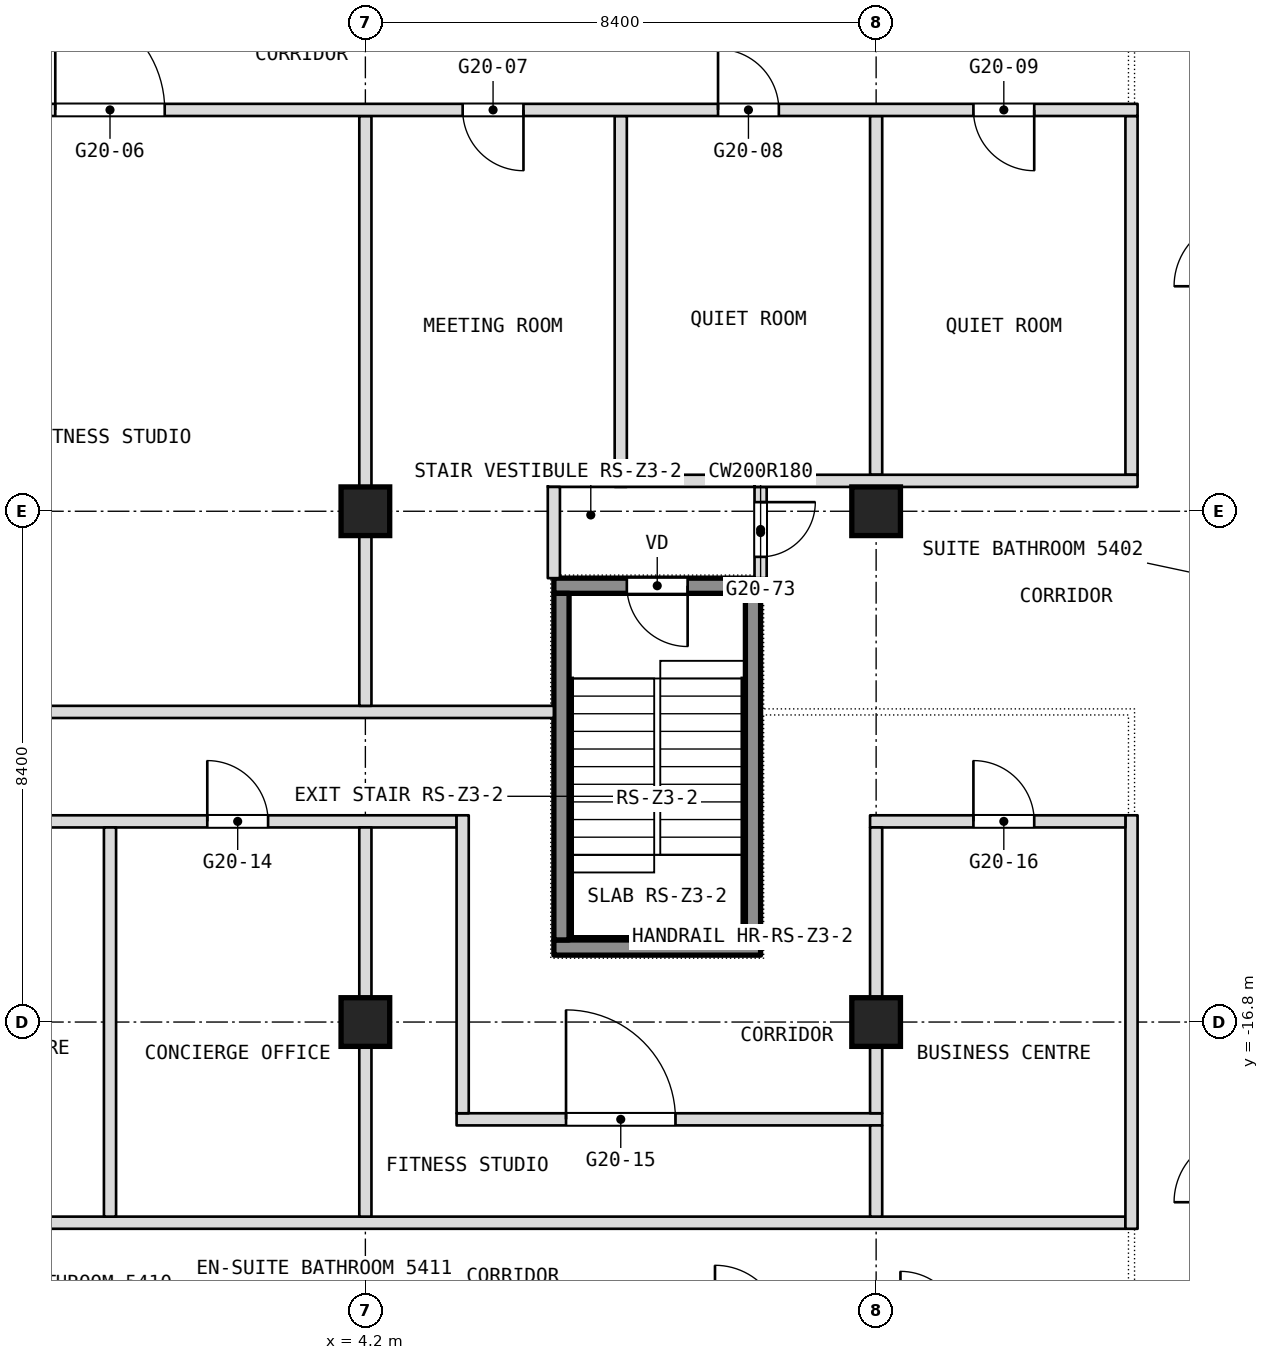
"""IFC4 building model, lengths in metres.
Left out: names, types, materials, properties, quantities, classifications, styles, units other than length and angle.
Written with IfcOpenShell. Run it as: python <this file> out.ifc"""

import sys

from ifc_helpers import new_model, si_unit, direction, frame, frame_2d, origin, origin_2d, place, context, subcontext, project, spatial, rectangle, extrude, element, fill, save


model = new_model("IFC4")
c1 = context("Model", 3, precision=1e-05, world=origin(), true_north=direction((0.0, 1.0)))
c2 = subcontext(c1, "Body", "Model", "MODEL_VIEW")
j1 = project(units=[si_unit("LENGTHUNIT", "METRE"), si_unit("PLANEANGLEUNIT", "RADIAN")], contexts=[c1])
p1 = place(None, origin())
s1 = spatial("IfcSite", under=j1, at=p1, CompositionType="ELEMENT")
p2 = place(p1, origin())
s2 = spatial("IfcBuilding", under=s1, at=p2, CompositionType="ELEMENT")
p3 = place(p2, frame((0.0, 0.0, 230.9)))
s3 = spatial("IfcBuildingStorey", under=s2, at=p3, CompositionType="ELEMENT", Elevation=230.9)
for number, where, z_axis, x_axis in (
    (1, (4.2, -16.8, 0.0), (0.0, 0.0, 1.0), (1.0, 0.0, 0.0)),
    (2, (4.2, -8.4, 0.0), (0.0, 0.0, 1.0), (1.0, 0.0, 0.0)),
    (3, (12.6, -16.8, 0.0), (0.0, 0.0, 1.0), (1.0, 0.0, 0.0)),
    (4, (12.6, -8.4, 0.0), (0.0, 0.0, 1.0), (1.0, 0.0, 0.0)),
):
    element("IfcColumn", number, at=place(p3, frame(where, z_axis=z_axis, x_axis=x_axis)), inside=s3, PredefinedType="COLUMN", context=c2, shape_type="SweptSolid", body=[
        extrude(rectangle(XDim=0.8, YDim=0.8, at=origin_2d()), origin(), (0.0, 0.0, 1.0), 3.6),
    ])
p4 = place(p3, frame((-16.7, -20.1, 0.0), z_axis=(0.0, 0.0, 1.0), x_axis=(1.0, 0.0, 0.0)))
e5 = element("IfcWall", 5, at=p4, inside=s3, PredefinedType="PARTITIONING", context=c2, shape_type="SweptSolid", body=[
    extrude(rectangle(XDim=33.4, YDim=0.2, at=frame_2d((16.7, 0.0))), origin(), (0.0, 0.0, 1.0), 3.34),
])
p5 = place(p3, frame((5.7, -18.4, 0.0), z_axis=(0.0, 0.0, 1.0), x_axis=(1.0, 0.0, 0.0)))
e6 = element("IfcWall", 6, at=p5, inside=s3, PredefinedType="PARTITIONING", context=c2, shape_type="SweptSolid", body=[
    extrude(rectangle(XDim=7.0, YDim=0.2, at=frame_2d((3.5, 0.0))), origin(), (0.0, 0.0, 1.0), 3.34),
])
p6 = place(p5, frame((1.8, 0.0, 0.0)))
e7 = element("IfcOpeningElement", 7, at=p6, cuts=e6, PredefinedType="OPENING", context=c2, shape_type="SweptSolid", body=[
    extrude(rectangle(XDim=1.8, YDim=2.1, at=frame_2d((0.9, 1.05))), frame((0.0, 0.1, 0.0), z_axis=(0.0, -1.0, 0.0), x_axis=(1.0, 0.0, 0.0)), (0.0, 0.0, 1.0), 0.2),
])
p7 = place(p3, frame((16.8, -20.2, 0.0), z_axis=(0.0, 0.0, 1.0), x_axis=(0.0, 1.0, 0.0)))
e8 = element("IfcWall", 8, at=p7, inside=s3, PredefinedType="PARTITIONING", context=c2, shape_type="SweptSolid", body=[
    extrude(rectangle(XDim=6.8, YDim=0.2, at=frame_2d((3.4, 0.0))), origin(), (0.0, 0.0, 1.0), 3.34),
])
p8 = place(p3, frame((16.8, -7.8, 0.0), z_axis=(0.0, 0.0, 1.0), x_axis=(0.0, 1.0, 0.0)))
e9 = element("IfcWall", 9, at=p8, inside=s3, PredefinedType="PARTITIONING", context=c2, shape_type="SweptSolid", body=[
    extrude(rectangle(XDim=5.9, YDim=0.2, at=frame_2d((2.95, 0.0))), origin(), (0.0, 0.0, 1.0), 3.34),
])
p9 = place(p3, frame((-5.9, -13.5, 0.0), z_axis=(0.0, 0.0, 1.0), x_axis=(1.0, 0.0, 0.0)))
e10 = element("IfcWall", 10, at=p9, inside=s3, PredefinedType="PARTITIONING", context=c2, shape_type="SweptSolid", body=[
    extrude(rectangle(XDim=11.6, YDim=0.2, at=frame_2d((5.8, 0.0))), origin(), (0.0, 0.0, 1.0), 3.34),
])
p10 = place(p9, frame((3.3, 0.0, 0.0)))
e11 = element("IfcOpeningElement", 11, at=p10, cuts=e10, PredefinedType="OPENING", context=c2, shape_type="SweptSolid", body=[
    extrude(rectangle(XDim=1.0, YDim=2.1, at=frame_2d((0.5, 1.05))), frame((0.0, 0.1, 0.0), z_axis=(0.0, -1.0, 0.0), x_axis=(1.0, 0.0, 0.0)), (0.0, 0.0, 1.0), 0.2),
])
p11 = place(p9, frame((7.5, 0.0, 0.0)))
e12 = element("IfcOpeningElement", 12, at=p11, cuts=e10, PredefinedType="OPENING", context=c2, shape_type="SweptSolid", body=[
    extrude(rectangle(XDim=1.0, YDim=2.1, at=frame_2d((0.5, 1.05))), frame((0.0, 0.1, 0.0), z_axis=(0.0, -1.0, 0.0), x_axis=(1.0, 0.0, 0.0)), (0.0, 0.0, 1.0), 0.2),
])
p12 = place(p3, frame((12.5, -13.5, 0.0), z_axis=(0.0, 0.0, 1.0), x_axis=(1.0, 0.0, 0.0)))
e13 = element("IfcWall", 13, at=p12, inside=s3, PredefinedType="PARTITIONING", context=c2, shape_type="SweptSolid", body=[
    extrude(rectangle(XDim=4.2, YDim=0.2, at=frame_2d((2.1, 0.0))), origin(), (0.0, 0.0, 1.0), 3.34),
])
p13 = place(p12, frame((1.7, 0.0, 0.0)))
e14 = element("IfcOpeningElement", 14, at=p13, cuts=e13, PredefinedType="OPENING", context=c2, shape_type="SweptSolid", body=[
    extrude(rectangle(XDim=1.0, YDim=2.1, at=frame_2d((0.5, 1.05))), frame((0.0, 0.1, 0.0), z_axis=(0.0, -1.0, 0.0), x_axis=(1.0, 0.0, 0.0)), (0.0, 0.0, 1.0), 0.2),
])
p14 = place(p3, frame((12.6, -20.0, 0.0), z_axis=(0.0, 0.0, 1.0), x_axis=(0.0, 1.0, 0.0)))
e15 = element("IfcWall", 15, at=p14, inside=s3, PredefinedType="PARTITIONING", context=c2, shape_type="SweptSolid", body=[
    extrude(rectangle(XDim=1.5, YDim=0.2, at=frame_2d((0.75, 0.0))), origin(), (0.0, 0.0, 1.0), 3.34),
])
p15 = place(p3, frame((12.6, -7.8, 0.0), z_axis=(0.0, 0.0, 1.0), x_axis=(0.0, 1.0, 0.0)))
e16 = element("IfcWall", 16, at=p15, inside=s3, PredefinedType="PARTITIONING", context=c2, shape_type="SweptSolid", body=[
    extrude(rectangle(XDim=5.9, YDim=0.2, at=frame_2d((2.95, 0.0))), origin(), (0.0, 0.0, 1.0), 3.34),
])
p16 = place(p3, frame((12.6, -18.3, 0.0), z_axis=(0.0, 0.0, 1.0), x_axis=(0.0, 1.0, 0.0)))
e17 = element("IfcWall", 17, at=p16, inside=s3, PredefinedType="PARTITIONING", context=c2, shape_type="SweptSolid", body=[
    extrude(rectangle(XDim=4.7, YDim=0.2, at=frame_2d((2.35, 0.0))), origin(), (0.0, 0.0, 1.0), 3.34),
])
p17 = place(p3, frame((-7.3, -11.7, 0.0), z_axis=(0.0, 0.0, 1.0), x_axis=(1.0, 0.0, 0.0)))
e18 = element("IfcWall", 18, at=p17, inside=s3, PredefinedType="PARTITIONING", context=c2, shape_type="SweptSolid", body=[
    extrude(rectangle(XDim=14.6, YDim=0.2, at=frame_2d((7.3, 0.0))), origin(), (0.0, 0.0, 1.0), 3.34),
])
p18 = place(p3, frame((10.7, -9.5, 0.0), z_axis=(0.0, 0.0, 1.0), x_axis=(0.0, 1.0, 0.0)))
e19 = element("IfcWall", 19, at=p18, inside=s3, PredefinedType="PARTITIONING", context=c2, shape_type="SweptSolid", body=[
    extrude(rectangle(XDim=1.5, YDim=0.2, at=frame_2d((0.75, 0.0))), origin(), (0.0, 0.0, 1.0), 3.34),
])
p19 = place(p18, frame((0.35, 0.0, 0.0)))
e20 = element("IfcOpeningElement", 20, at=p19, cuts=e19, PredefinedType="OPENING", context=c2, shape_type="SweptSolid", body=[
    extrude(rectangle(XDim=0.9, YDim=2.1, at=frame_2d((0.45, 1.05))), frame((0.0, 0.1, 0.0), z_axis=(0.0, -1.0, 0.0), x_axis=(1.0, 0.0, 0.0)), (0.0, 0.0, 1.0), 0.2),
])
p20 = place(p3, frame((8.4, -8.0, 0.0), z_axis=(0.0, 0.0, 1.0), x_axis=(0.0, 1.0, 0.0)))
e21 = element("IfcWall", 21, at=p20, inside=s3, PredefinedType="PARTITIONING", context=c2, shape_type="SweptSolid", body=[
    extrude(rectangle(XDim=6.1, YDim=0.2, at=frame_2d((3.05, 0.0))), origin(), (0.0, 0.0, 1.0), 3.34),
])
p21 = place(p3, frame((10.6, -7.9, 0.0), z_axis=(0.0, 0.0, 1.0), x_axis=(1.0, 0.0, 0.0)))
e22 = element("IfcWall", 22, at=p21, inside=s3, PredefinedType="PARTITIONING", context=c2, shape_type="SweptSolid", body=[
    extrude(rectangle(XDim=6.3, YDim=0.2, at=frame_2d((3.15, 0.0))), origin(), (0.0, 0.0, 1.0), 3.34),
])
p22 = place(p3, frame((7.2, -7.9, 0.0), z_axis=(0.0, 0.0, 1.0), x_axis=(1.0, 0.0, 0.0)))
e23 = element("IfcWall", 23, at=p22, inside=s3, PredefinedType="PARTITIONING", context=c2, shape_type="SweptSolid", body=[
    extrude(rectangle(XDim=3.4, YDim=0.2, at=frame_2d((1.7, 0.0))), origin(), (0.0, 0.0, 1.0), 3.34),
])
p23 = place(p3, frame((7.3, -9.5, 0.0), z_axis=(0.0, 0.0, 1.0), x_axis=(0.0, 1.0, 0.0)))
e24 = element("IfcWall", 24, at=p23, inside=s3, PredefinedType="PARTITIONING", context=c2, shape_type="SweptSolid", body=[
    extrude(rectangle(XDim=1.5, YDim=0.2, at=frame_2d((0.75, 0.0))), origin(), (0.0, 0.0, 1.0), 3.34),
])
p24 = place(p3, frame((5.8, -18.3, 0.0), z_axis=(0.0, 0.0, 1.0), x_axis=(0.0, 1.0, 0.0)))
e25 = element("IfcWall", 25, at=p24, inside=s3, PredefinedType="PARTITIONING", context=c2, shape_type="SweptSolid", body=[
    extrude(rectangle(XDim=4.9, YDim=0.2, at=frame_2d((2.45, 0.0))), origin(), (0.0, 0.0, 1.0), 3.34),
])
p25 = place(p3, frame((4.2, -20.0, 0.0), z_axis=(0.0, 0.0, 1.0), x_axis=(0.0, 1.0, 0.0)))
e26 = element("IfcWall", 26, at=p25, inside=s3, PredefinedType="PARTITIONING", context=c2, shape_type="SweptSolid", body=[
    extrude(rectangle(XDim=6.4, YDim=0.2, at=frame_2d((3.2, 0.0))), origin(), (0.0, 0.0, 1.0), 3.34),
])
p26 = place(p3, frame((4.2, -11.6, 0.0), z_axis=(0.0, 0.0, 1.0), x_axis=(0.0, 1.0, 0.0)))
e27 = element("IfcWall", 27, at=p26, inside=s3, PredefinedType="PARTITIONING", context=c2, shape_type="SweptSolid", body=[
    extrude(rectangle(XDim=9.7, YDim=0.2, at=frame_2d((4.85, 0.0))), origin(), (0.0, 0.0, 1.0), 3.34),
])
p27 = place(p3, frame((-16.9, -1.8, 0.0), z_axis=(0.0, 0.0, 1.0), x_axis=(1.0, 0.0, 0.0)))
e28 = element("IfcWall", 28, at=p27, inside=s3, PredefinedType="PARTITIONING", context=c2, shape_type="SweptSolid", body=[
    extrude(rectangle(XDim=33.8, YDim=0.2, at=frame_2d((16.9, 0.0))), origin(), (0.0, 0.0, 1.0), 3.34),
])
p28 = place(p27, frame((1.7, 0.0, 0.0)))
e29 = element("IfcOpeningElement", 29, at=p28, cuts=e28, PredefinedType="OPENING", context=c2, shape_type="SweptSolid", body=[
    extrude(rectangle(XDim=1.0, YDim=2.1, at=frame_2d((0.5, 1.05))), frame((0.0, 0.1, 0.0), z_axis=(0.0, -1.0, 0.0), x_axis=(1.0, 0.0, 0.0)), (0.0, 0.0, 1.0), 0.2),
])
p29 = place(p27, frame((5.9, 0.0, 0.0)))
e30 = element("IfcOpeningElement", 30, at=p29, cuts=e28, PredefinedType="OPENING", context=c2, shape_type="SweptSolid", body=[
    extrude(rectangle(XDim=1.0, YDim=2.1, at=frame_2d((0.5, 1.05))), frame((0.0, 0.1, 0.0), z_axis=(0.0, -1.0, 0.0), x_axis=(1.0, 0.0, 0.0)), (0.0, 0.0, 1.0), 0.2),
])
p30 = place(p27, frame((10.1, 0.0, 0.0)))
e31 = element("IfcOpeningElement", 31, at=p30, cuts=e28, PredefinedType="OPENING", context=c2, shape_type="SweptSolid", body=[
    extrude(rectangle(XDim=1.0, YDim=2.1, at=frame_2d((0.5, 1.05))), frame((0.0, 0.1, 0.0), z_axis=(0.0, -1.0, 0.0), x_axis=(1.0, 0.0, 0.0)), (0.0, 0.0, 1.0), 0.2),
])
p31 = place(p27, frame((16.0, 0.0, 0.0)))
e32 = element("IfcOpeningElement", 32, at=p31, cuts=e28, PredefinedType="OPENING", context=c2, shape_type="SweptSolid", body=[
    extrude(rectangle(XDim=1.8, YDim=2.1, at=frame_2d((0.9, 1.05))), frame((0.0, 0.1, 0.0), z_axis=(0.0, -1.0, 0.0), x_axis=(1.0, 0.0, 0.0)), (0.0, 0.0, 1.0), 0.2),
])
p32 = place(p27, frame((22.7, 0.0, 0.0)))
e33 = element("IfcOpeningElement", 33, at=p32, cuts=e28, PredefinedType="OPENING", context=c2, shape_type="SweptSolid", body=[
    extrude(rectangle(XDim=1.0, YDim=2.1, at=frame_2d((0.5, 1.05))), frame((0.0, 0.1, 0.0), z_axis=(0.0, -1.0, 0.0), x_axis=(1.0, 0.0, 0.0)), (0.0, 0.0, 1.0), 0.2),
])
p33 = place(p27, frame((26.9, 0.0, 0.0)))
e34 = element("IfcOpeningElement", 34, at=p33, cuts=e28, PredefinedType="OPENING", context=c2, shape_type="SweptSolid", body=[
    extrude(rectangle(XDim=1.0, YDim=2.1, at=frame_2d((0.5, 1.05))), frame((0.0, 0.1, 0.0), z_axis=(0.0, -1.0, 0.0), x_axis=(1.0, 0.0, 0.0)), (0.0, 0.0, 1.0), 0.2),
])
p34 = place(p27, frame((31.1, 0.0, 0.0)))
e35 = element("IfcOpeningElement", 35, at=p34, cuts=e28, PredefinedType="OPENING", context=c2, shape_type="SweptSolid", body=[
    extrude(rectangle(XDim=1.0, YDim=2.1, at=frame_2d((0.5, 1.05))), frame((0.0, 0.1, 0.0), z_axis=(0.0, -1.0, 0.0), x_axis=(1.0, 0.0, 0.0)), (0.0, 0.0, 1.0), 0.2),
])
p35 = place(p3, frame((0.0, -20.0, 0.0), z_axis=(0.0, 0.0, 1.0), x_axis=(0.0, 1.0, 0.0)))
e36 = element("IfcWall", 36, at=p35, inside=s3, PredefinedType="PARTITIONING", context=c2, shape_type="SweptSolid", body=[
    extrude(rectangle(XDim=6.4, YDim=0.2, at=frame_2d((3.2, 0.0))), origin(), (0.0, 0.0, 1.0), 3.34),
])
p36 = place(p3, frame((7.3, -15.575, 0.1), z_axis=(0.0, 0.0, 1.0), x_axis=(1.0, 0.0, 0.0)))
e37 = element("IfcWall", 37, at=p36, inside=s3, PredefinedType="SHEAR", context=c2, shape_type="SweptSolid", body=[
    extrude(rectangle(XDim=3.4, YDim=0.25, at=frame_2d((1.7, 0.0))), origin(), (0.0, 0.0, 1.0), 3.6),
])
p37 = place(p3, frame((7.3, -9.625, 0.1), z_axis=(0.0, 0.0, 1.0), x_axis=(1.0, 0.0, 0.0)))
e38 = element("IfcWall", 38, at=p37, inside=s3, PredefinedType="SHEAR", context=c2, shape_type="SweptSolid", body=[
    extrude(rectangle(XDim=3.4, YDim=0.25, at=frame_2d((1.7, 0.0))), origin(), (0.0, 0.0, 1.0), 3.6),
])
p38 = place(p37, frame((1.2, 0.0, 0.0)))
e39 = element("IfcOpeningElement", 39, at=p38, cuts=e38, PredefinedType="OPENING", context=c2, shape_type="SweptSolid", body=[
    extrude(rectangle(XDim=1.0, YDim=2.1, at=frame_2d((0.5, 1.05))), frame((0.0, 0.125, 0.0), z_axis=(0.0, -1.0, 0.0), x_axis=(1.0, 0.0, 0.0)), (0.0, 0.0, 1.0), 0.25),
])
for number, where, z_axis, x_axis in (
    (40, (7.425, -15.45, 0.1), (0.0, 0.0, 1.0), (0.0, 1.0, 0.0)),
    (41, (10.575, -15.45, 0.1), (0.0, 0.0, 1.0), (0.0, 1.0, 0.0)),
):
    element("IfcWall", number, at=place(p3, frame(where, z_axis=z_axis, x_axis=x_axis)), inside=s3, PredefinedType="SHEAR", context=c2, shape_type="SweptSolid", body=[
        extrude(rectangle(XDim=5.7, YDim=0.25, at=frame_2d((2.85, 0.0))), origin(), (0.0, 0.0, 1.0), 3.6),
    ])
p39 = place(p6, origin())
e42 = element("IfcDoor", 42, at=p39, inside=s3, OperationType="DOUBLE_DOOR_SINGLE_SWING", PredefinedType="DOOR", context=c2, shape_type="SweptSolid", body=[
    extrude(rectangle(XDim=1.8, YDim=2.1, at=frame_2d((0.9, 1.05))), frame((0.0, 0.025, 0.0), z_axis=(0.0, -1.0, 0.0), x_axis=(1.0, 0.0, 0.0)), (0.0, 0.0, 1.0), 0.05),
])
fill(e7, e42)
p40 = place(p11, origin())
e43 = element("IfcDoor", 43, at=p40, inside=s3, OperationType="SINGLE_SWING_RIGHT", PredefinedType="DOOR", context=c2, shape_type="SweptSolid", body=[
    extrude(rectangle(XDim=1.0, YDim=2.1, at=frame_2d((0.5, 1.05))), frame((0.0, 0.025, 0.0), z_axis=(0.0, -1.0, 0.0), x_axis=(1.0, 0.0, 0.0)), (0.0, 0.0, 1.0), 0.05),
])
fill(e12, e43)
p41 = place(p13, origin())
e44 = element("IfcDoor", 44, at=p41, inside=s3, OperationType="SINGLE_SWING_RIGHT", PredefinedType="DOOR", context=c2, shape_type="SweptSolid", body=[
    extrude(rectangle(XDim=1.0, YDim=2.1, at=frame_2d((0.5, 1.05))), frame((0.0, 0.025, 0.0), z_axis=(0.0, -1.0, 0.0), x_axis=(1.0, 0.0, 0.0)), (0.0, 0.0, 1.0), 0.05),
])
fill(e14, e44)
p42 = place(p19, origin())
e45 = element("IfcDoor", 45, at=p42, inside=s3, OperationType="SINGLE_SWING_RIGHT", PredefinedType="DOOR", context=c2, shape_type="SweptSolid", body=[
    extrude(rectangle(XDim=0.9, YDim=2.1, at=frame_2d((0.45, 1.05))), frame((0.0, 0.025, 0.0), z_axis=(0.0, -1.0, 0.0), x_axis=(1.0, 0.0, 0.0)), (0.0, 0.0, 1.0), 0.05),
])
fill(e20, e45)
p43 = place(p31, origin())
e46 = element("IfcDoor", 46, at=p43, inside=s3, OperationType="DOUBLE_DOOR_SINGLE_SWING", PredefinedType="DOOR", context=c2, shape_type="SweptSolid", body=[
    extrude(rectangle(XDim=1.8, YDim=2.1, at=frame_2d((0.9, 1.05))), frame((0.0, 0.025, 0.0), z_axis=(0.0, -1.0, 0.0), x_axis=(1.0, 0.0, 0.0)), (0.0, 0.0, 1.0), 0.05),
])
fill(e32, e46)
p44 = place(p32, origin())
e47 = element("IfcDoor", 47, at=p44, inside=s3, OperationType="SINGLE_SWING_RIGHT", PredefinedType="DOOR", context=c2, shape_type="SweptSolid", body=[
    extrude(rectangle(XDim=1.0, YDim=2.1, at=frame_2d((0.5, 1.05))), frame((0.0, 0.025, 0.0), z_axis=(0.0, -1.0, 0.0), x_axis=(1.0, 0.0, 0.0)), (0.0, 0.0, 1.0), 0.05),
])
fill(e33, e47)
p45 = place(p33, origin())
e48 = element("IfcDoor", 48, at=p45, inside=s3, OperationType="SINGLE_SWING_LEFT", PredefinedType="DOOR", context=c2, shape_type="SweptSolid", body=[
    extrude(rectangle(XDim=1.0, YDim=2.1, at=frame_2d((0.5, 1.05))), frame((0.0, 0.025, 0.0), z_axis=(0.0, -1.0, 0.0), x_axis=(1.0, 0.0, 0.0)), (0.0, 0.0, 1.0), 0.05),
])
fill(e34, e48)
p46 = place(p34, origin())
e49 = element("IfcDoor", 49, at=p46, inside=s3, OperationType="SINGLE_SWING_RIGHT", PredefinedType="DOOR", context=c2, shape_type="SweptSolid", body=[
    extrude(rectangle(XDim=1.0, YDim=2.1, at=frame_2d((0.5, 1.05))), frame((0.0, 0.025, 0.0), z_axis=(0.0, -1.0, 0.0), x_axis=(1.0, 0.0, 0.0)), (0.0, 0.0, 1.0), 0.05),
])
fill(e35, e49)
p47 = place(p38, origin())
e50 = element("IfcDoor", 50, at=p47, inside=s3, OperationType="SINGLE_SWING_LEFT", PredefinedType="DOOR", context=c2, shape_type="SweptSolid", body=[
    extrude(rectangle(XDim=1.0, YDim=2.1, at=frame_2d((0.5, 1.05))), frame((0.0, 0.025, 0.0), z_axis=(0.0, -1.0, 0.0), x_axis=(1.0, 0.0, 0.0)), (0.0, 0.0, 1.0), 0.05),
])
fill(e39, e50)
save(model, sys.argv[1])
